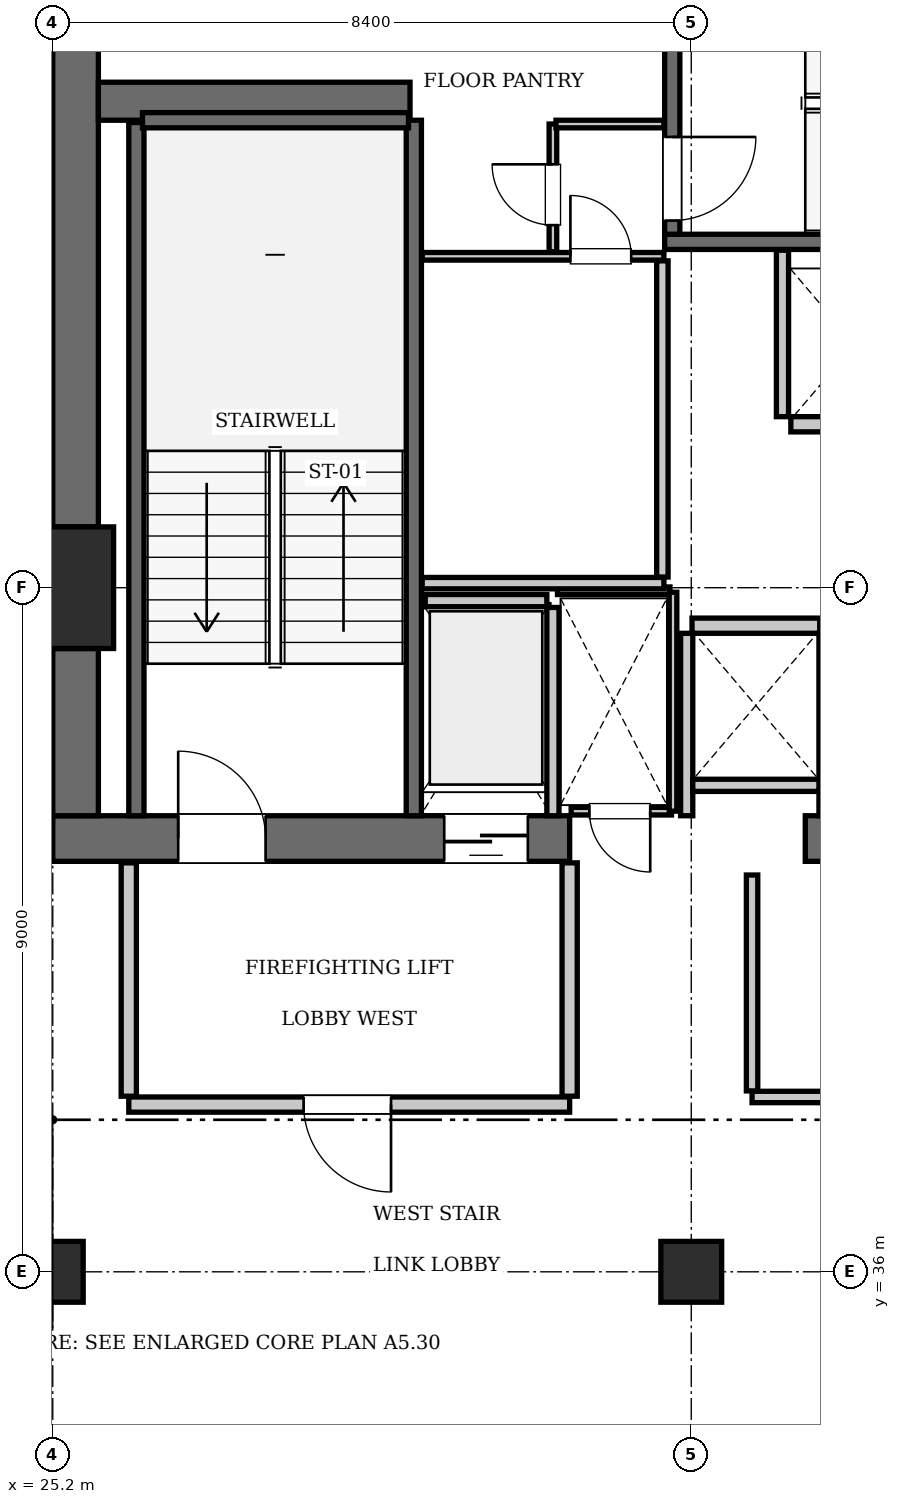
"""IFC4 building model, lengths in metres.
Left out: names, types, materials, properties, quantities, classifications, styles, units other than length and angle.
Written with IfcOpenShell. Run it as: python <this file> out.ifc"""

import sys

from ifc_helpers import new_model, si_unit, direction, frame, frame_2d, origin, origin_2d, place, context, subcontext, project, spatial, rectangle, extrude, element, fill, save


model = new_model("IFC4")
c1 = context("Model", 3, precision=1e-05, world=origin(), true_north=direction((0.0, 1.0)))
c2 = subcontext(c1, "Body", "Model", "MODEL_VIEW")
j1 = project(units=[si_unit("LENGTHUNIT", "METRE"), si_unit("PLANEANGLEUNIT", "RADIAN")], contexts=[c1])
p1 = place(None, origin())
s1 = spatial("IfcSite", under=j1, at=p1, CompositionType="ELEMENT")
p2 = place(p1, origin())
s2 = spatial("IfcBuilding", under=s1, at=p2, CompositionType="ELEMENT")
p3 = place(p2, frame((0.0, 0.0, 270.2)))
s3 = spatial("IfcBuildingStorey", under=s2, at=p3, CompositionType="ELEMENT", Elevation=270.2)
p4 = place(p3, frame((25.2, 45.0, 0.0), z_axis=(0.0, 0.0, 1.0), x_axis=(1.0, 0.0, 0.0)))
e1 = element("IfcColumn", 1, at=p4, inside=s3, PredefinedType="COLUMN", context=c2, shape_type="SweptSolid", body=[
    extrude(rectangle(XDim=1.6, YDim=1.6, at=origin_2d()), origin(), (0.0, 0.0, 1.0), 3.85),
])
p5 = place(p3, frame((25.2, 41.7, 0.0), z_axis=(0.0, 0.0, 1.0), x_axis=(1.0, 0.0, 0.0)))
e2 = element("IfcWall", 2, at=p5, inside=s3, PredefinedType="SHEAR", context=c2, shape_type="SweptSolid", body=[
    extrude(rectangle(XDim=6.8, YDim=0.6, at=frame_2d((3.4, 0.0))), origin(), (0.0, 0.0, 1.0), 3.85),
])
p6 = place(p5, frame((1.65, 0.0, 0.0)))
e3 = element("IfcOpeningElement", 3, at=p6, cuts=e2, PredefinedType="OPENING", context=c2, shape_type="SweptSolid", body=[
    extrude(rectangle(XDim=1.15, YDim=2.15, at=frame_2d((0.575, 1.075))), frame((0.0, 0.31, 0.0), z_axis=(0.0, -1.0, 0.0), x_axis=(1.0, 0.0, 0.0)), (0.0, 0.0, 1.0), 0.62),
])
p7 = place(p5, frame((5.15, 0.0, 0.0)))
e4 = element("IfcOpeningElement", 4, at=p7, cuts=e2, PredefinedType="OPENING", context=c2, shape_type="SweptSolid", body=[
    extrude(rectangle(XDim=1.1, YDim=2.2, at=frame_2d((0.55, 1.1))), frame((0.0, 0.31, 0.0), z_axis=(0.0, -1.0, 0.0), x_axis=(1.0, 0.0, 0.0)), (0.0, 0.0, 1.0), 0.62),
])
p8 = place(p3, frame((35.1, 41.7, 0.0), z_axis=(0.0, 0.0, 1.0), x_axis=(1.0, 0.0, 0.0)))
e5 = element("IfcWall", 5, at=p8, inside=s3, PredefinedType="SHEAR", context=c2, shape_type="SweptSolid", body=[
    extrude(rectangle(XDim=5.4, YDim=0.6, at=frame_2d((2.7, 0.0))), origin(), (0.0, 0.0, 1.0), 3.85),
])
p9 = place(p3, frame((25.5, 42.0, 0.0), z_axis=(0.0, 0.0, 1.0), x_axis=(0.0, 1.0, 0.0)))
e6 = element("IfcWall", 6, at=p9, inside=s3, PredefinedType="SHEAR", context=c2, shape_type="SweptSolid", body=[
    extrude(rectangle(XDim=2.2, YDim=0.6, at=frame_2d((1.1, 0.0))), origin(), (0.0, 0.0, 1.0), 3.85),
])
p10 = place(p3, frame((25.5, 45.8, 0.0), z_axis=(0.0, 0.0, 1.0), x_axis=(0.0, 1.0, 0.0)))
e7 = element("IfcWall", 7, at=p10, inside=s3, PredefinedType="SHEAR", context=c2, shape_type="SweptSolid", body=[
    extrude(rectangle(XDim=7.6, YDim=0.6, at=frame_2d((3.8, 0.0))), origin(), (0.0, 0.0, 1.0), 3.85),
])
p11 = place(p3, frame((25.8, 51.4, 0.0), z_axis=(0.0, 0.0, 1.0), x_axis=(1.0, 0.0, 0.0)))
e8 = element("IfcWall", 8, at=p11, inside=s3, PredefinedType="SHEAR", context=c2, shape_type="SweptSolid", body=[
    extrude(rectangle(XDim=4.1, YDim=0.5, at=frame_2d((2.05, 0.0))), origin(), (0.0, 0.0, 1.0), 3.85),
])
for number, where, z_axis, x_axis in (
    (9, (25.2, 36.0, 0.0), (0.0, 0.0, 1.0), (1.0, 0.0, 0.0)),
    (10, (33.6, 36.0, 0.0), (0.0, 0.0, 1.0), (1.0, 0.0, 0.0)),
):
    element("IfcColumn", number, at=place(p3, frame(where, z_axis=z_axis, x_axis=x_axis)), inside=s3, PredefinedType="COLUMN", context=c2, shape_type="SweptSolid", body=[
        extrude(rectangle(XDim=0.8, YDim=0.8, at=origin_2d()), origin(), (0.0, 0.0, 1.0), 3.85),
    ])
p12 = place(p3, frame((29.95, 42.0, 0.0), z_axis=(0.0, 0.0, 1.0), x_axis=(0.0, 1.0, 0.0)))
e11 = element("IfcWall", 11, at=p12, inside=s3, PredefinedType="SOLIDWALL", context=c2, shape_type="SweptSolid", body=[
    extrude(rectangle(XDim=9.15, YDim=0.2, at=frame_2d((4.575, 0.0))), origin(), (0.0, 0.0, 1.0), 3.61),
])
p13 = place(p3, frame((26.3, 42.0, 0.0), z_axis=(0.0, 0.0, 1.0), x_axis=(0.0, 1.0, 0.0)))
e12 = element("IfcWall", 12, at=p13, inside=s3, PredefinedType="SOLIDWALL", context=c2, shape_type="SweptSolid", body=[
    extrude(rectangle(XDim=9.12, YDim=0.2, at=frame_2d((4.56, 0.0))), origin(), (0.0, 0.0, 1.0), 3.61),
])
p14 = place(p3, frame((26.38, 51.15, 0.0), z_axis=(0.0, 0.0, 1.0), x_axis=(1.0, 0.0, 0.0)))
e13 = element("IfcWall", 13, at=p14, inside=s3, PredefinedType="SOLIDWALL", context=c2, shape_type="SweptSolid", body=[
    extrude(rectangle(XDim=3.5, YDim=0.2, at=frame_2d((1.75, 0.0))), origin(), (0.0, 0.0, 1.0), 3.61),
])
p15 = place(p3, frame((33.25, 49.55, 0.0), z_axis=(0.0, 0.0, 1.0), x_axis=(1.0, 0.0, 0.0)))
e14 = element("IfcWall", 14, at=p15, inside=s3, PredefinedType="SOLIDWALL", context=c2, shape_type="SweptSolid", body=[
    extrude(rectangle(XDim=9.1, YDim=0.2, at=frame_2d((4.55, 0.0))), origin(), (0.0, 0.0, 1.0), 3.61),
])
p16 = place(p3, frame((33.35, 49.65, 0.0), z_axis=(0.0, 0.0, 1.0), x_axis=(0.0, 1.0, 0.0)))
e15 = element("IfcWall", 15, at=p16, inside=s3, PredefinedType="SOLIDWALL", context=c2, shape_type="SweptSolid", body=[
    extrude(rectangle(XDim=3.75, YDim=0.2, at=frame_2d((1.875, 0.0))), origin(), (0.0, 0.0, 1.0), 3.61),
])
p17 = place(p16, frame((0.18, 0.0, 0.0)))
e16 = element("IfcOpeningElement", 16, at=p17, cuts=e15, PredefinedType="OPENING", context=c2, shape_type="SweptSolid", body=[
    extrude(rectangle(XDim=1.1, YDim=2.15, at=frame_2d((0.55, 1.075))), frame((0.0, 0.11, 0.0), z_axis=(0.0, -1.0, 0.0), x_axis=(1.0, 0.0, 0.0)), (0.0, 0.0, 1.0), 0.22),
])
p18 = place(p3, frame((34.91, 47.15, 0.0), z_axis=(0.0, 0.0, 1.0), x_axis=(1.0, 0.0, 0.0)))
e17 = element("IfcWall", 17, at=p18, inside=s3, PredefinedType="SOLIDWALL", context=c2, shape_type="SweptSolid", body=[
    extrude(rectangle(XDim=1.68, YDim=0.2, at=frame_2d((0.84, 0.0))), origin(), (0.0, 0.0, 1.0), 3.61),
])
p19 = place(p3, frame((33.61, 44.5, 0.0), z_axis=(0.0, 0.0, 1.0), x_axis=(1.0, 0.0, 0.0)))
e18 = element("IfcWall", 18, at=p19, inside=s3, PredefinedType="SOLIDWALL", context=c2, shape_type="SweptSolid", body=[
    extrude(rectangle(XDim=1.68, YDim=0.2, at=frame_2d((0.84, 0.0))), origin(), (0.0, 0.0, 1.0), 3.61),
])
p20 = place(p3, frame((30.1, 44.83, 0.0), z_axis=(0.0, 0.0, 1.0), x_axis=(1.0, 0.0, 0.0)))
e19 = element("IfcWall", 19, at=p20, inside=s3, PredefinedType="SOLIDWALL", context=c2, shape_type="SweptSolid", body=[
    extrude(rectangle(XDim=1.6, YDim=0.16, at=frame_2d((0.8, 0.0))), origin(), (0.0, 0.0, 1.0), 3.61),
])
p21 = place(p3, frame((31.78, 42.0, 0.0), z_axis=(0.0, 0.0, 1.0), x_axis=(0.0, 1.0, 0.0)))
e20 = element("IfcWall", 20, at=p21, inside=s3, PredefinedType="SOLIDWALL", context=c2, shape_type="SweptSolid", body=[
    extrude(rectangle(XDim=2.74, YDim=0.16, at=frame_2d((1.37, 0.0))), origin(), (0.0, 0.0, 1.0), 3.61),
])
p22 = place(p3, frame((34.8, 47.25, 0.0), z_axis=(0.0, 0.0, 1.0), x_axis=(0.0, 1.0, 0.0)))
e21 = element("IfcWall", 21, at=p22, inside=s3, PredefinedType="SOLIDWALL", context=c2, shape_type="SweptSolid", body=[
    extrude(rectangle(XDim=2.19, YDim=0.16, at=frame_2d((1.095, 0.0))), origin(), (0.0, 0.0, 1.0), 3.61),
])
for number, where, z_axis, x_axis in (
    (22, (33.54, 42.0, 0.0), (0.0, 0.0, 1.0), (0.0, 1.0, 0.0)),
    (23, (35.36, 42.0, 0.0), (0.0, 0.0, 1.0), (0.0, 1.0, 0.0)),
):
    element("IfcWall", number, at=place(p3, frame(where, z_axis=z_axis, x_axis=x_axis)), inside=s3, PredefinedType="SOLIDWALL", context=c2, shape_type="SweptSolid", body=[
        extrude(rectangle(XDim=2.4, YDim=0.16, at=frame_2d((1.2, 0.0))), origin(), (0.0, 0.0, 1.0), 3.61),
    ])
p23 = place(p3, frame((33.62, 42.4, 0.0), z_axis=(0.0, 0.0, 1.0), x_axis=(1.0, 0.0, 0.0)))
e24 = element("IfcWall", 24, at=p23, inside=s3, PredefinedType="SOLIDWALL", context=c2, shape_type="SweptSolid", body=[
    extrude(rectangle(XDim=1.66, YDim=0.16, at=frame_2d((0.83, 0.0))), origin(), (0.0, 0.0, 1.0), 3.61),
])
p24 = place(p3, frame((26.2, 38.2, 0.0), z_axis=(0.0, 0.0, 1.0), x_axis=(1.0, 0.0, 0.0)))
e25 = element("IfcWall", 25, at=p24, inside=s3, PredefinedType="PARTITIONING", context=c2, shape_type="SweptSolid", body=[
    extrude(rectangle(XDim=5.8, YDim=0.2, at=frame_2d((2.9, 0.0))), origin(), (0.0, 0.0, 1.0), 3.61),
])
p25 = place(p24, frame((2.3, 0.0, 0.0)))
e26 = element("IfcOpeningElement", 26, at=p25, cuts=e25, PredefinedType="OPENING", context=c2, shape_type="SweptSolid", body=[
    extrude(rectangle(XDim=1.15, YDim=2.15, at=frame_2d((0.575, 1.075))), frame((0.0, 0.11, 0.0), z_axis=(0.0, -1.0, 0.0), x_axis=(1.0, 0.0, 0.0)), (0.0, 0.0, 1.0), 0.22),
])
for number, where, z_axis, x_axis in (
    (27, (26.2, 38.31, 0.0), (0.0, 0.0, 1.0), (0.0, 1.0, 0.0)),
    (28, (32.0, 38.31, 0.0), (0.0, 0.0, 1.0), (0.0, 1.0, 0.0)),
):
    element("IfcWall", number, at=place(p3, frame(where, z_axis=z_axis, x_axis=x_axis)), inside=s3, PredefinedType="PARTITIONING", context=c2, shape_type="SweptSolid", body=[
        extrude(rectangle(XDim=3.07, YDim=0.2, at=frame_2d((1.535, 0.0))), origin(), (0.0, 0.0, 1.0), 3.61),
    ])
p26 = place(p3, frame((32.02, 42.06, 0.0), z_axis=(0.0, 0.0, 1.0), x_axis=(1.0, 0.0, 0.0)))
e29 = element("IfcWall", 29, at=p26, inside=s3, PredefinedType="PARTITIONING", context=c2, shape_type="SweptSolid", body=[
    extrude(rectangle(XDim=1.32, YDim=0.1, at=frame_2d((0.66, 0.0))), origin(), (0.0, 0.0, 1.0), 3.61),
])
p27 = place(p26, frame((0.24, 0.0, 0.0)))
e30 = element("IfcOpeningElement", 30, at=p27, cuts=e29, PredefinedType="OPENING", context=c2, shape_type="SweptSolid", body=[
    extrude(rectangle(XDim=0.8, YDim=2.05, at=frame_2d((0.4, 1.025))), frame((0.0, 0.06, 0.0), z_axis=(0.0, -1.0, 0.0), x_axis=(1.0, 0.0, 0.0)), (0.0, 0.0, 1.0), 0.12),
])
p28 = place(p3, frame((31.84, 44.96, 0.0), z_axis=(0.0, 0.0, 1.0), x_axis=(1.0, 0.0, 0.0)))
e31 = element("IfcWall", 31, at=p28, inside=s3, PredefinedType="PARTITIONING", context=c2, shape_type="SweptSolid", body=[
    extrude(rectangle(XDim=1.48, YDim=0.1, at=frame_2d((0.74, 0.0))), origin(), (0.0, 0.0, 1.0), 3.61),
])
p29 = place(p3, frame((33.36, 42.06, 0.0), z_axis=(0.0, 0.0, 1.0), x_axis=(0.0, 1.0, 0.0)))
e32 = element("IfcWall", 32, at=p29, inside=s3, PredefinedType="PARTITIONING", context=c2, shape_type="SweptSolid", body=[
    extrude(rectangle(XDim=2.88, YDim=0.1, at=frame_2d((1.44, 0.0))), origin(), (0.0, 0.0, 1.0), 3.61),
])
p30 = place(p3, frame((30.06, 45.06, 0.0), z_axis=(0.0, 0.0, 1.0), x_axis=(1.0, 0.0, 0.0)))
e33 = element("IfcWall", 33, at=p30, inside=s3, PredefinedType="PARTITIONING", context=c2, shape_type="SweptSolid", body=[
    extrude(rectangle(XDim=3.18, YDim=0.15, at=frame_2d((1.59, 0.0))), origin(), (0.0, 0.0, 1.0), 3.61),
])
p31 = place(p3, frame((33.22, 45.14, 0.0), z_axis=(0.0, 0.0, 1.0), x_axis=(0.0, 1.0, 0.0)))
e34 = element("IfcWall", 34, at=p31, inside=s3, PredefinedType="PARTITIONING", context=c2, shape_type="SweptSolid", body=[
    extrude(rectangle(XDim=4.16, YDim=0.15, at=frame_2d((2.08, 0.0))), origin(), (0.0, 0.0, 1.0), 3.61),
])
p32 = place(p3, frame((30.06, 49.36, 0.0), z_axis=(0.0, 0.0, 1.0), x_axis=(1.0, 0.0, 0.0)))
e35 = element("IfcWall", 35, at=p32, inside=s3, PredefinedType="PARTITIONING", context=c2, shape_type="SweptSolid", body=[
    extrude(rectangle(XDim=3.18, YDim=0.1, at=frame_2d((1.59, 0.0))), origin(), (0.0, 0.0, 1.0), 3.61),
])
p33 = place(p32, frame((1.95, 0.0, 0.0)))
e36 = element("IfcOpeningElement", 36, at=p33, cuts=e35, PredefinedType="OPENING", context=c2, shape_type="SweptSolid", body=[
    extrude(rectangle(XDim=0.8, YDim=2.05, at=frame_2d((0.4, 1.025))), frame((0.0, 0.06, 0.0), z_axis=(0.0, -1.0, 0.0), x_axis=(1.0, 0.0, 0.0)), (0.0, 0.0, 1.0), 0.12),
])
p34 = place(p3, frame((31.78, 49.42, 0.0), z_axis=(0.0, 0.0, 1.0), x_axis=(0.0, 1.0, 0.0)))
e37 = element("IfcWall", 37, at=p34, inside=s3, PredefinedType="PARTITIONING", context=c2, shape_type="SweptSolid", body=[
    extrude(rectangle(XDim=1.68, YDim=0.1, at=frame_2d((0.84, 0.0))), origin(), (0.0, 0.0, 1.0), 3.61),
])
p35 = place(p34, frame((0.35, 0.0, 0.0)))
e38 = element("IfcOpeningElement", 38, at=p35, cuts=e37, PredefinedType="OPENING", context=c2, shape_type="SweptSolid", body=[
    extrude(rectangle(XDim=0.8, YDim=2.05, at=frame_2d((0.4, 1.025))), frame((0.0, 0.06, 0.0), z_axis=(0.0, -1.0, 0.0), x_axis=(1.0, 0.0, 0.0)), (0.0, 0.0, 1.0), 0.12),
])
p36 = place(p3, frame((31.82, 51.1, 0.0), z_axis=(0.0, 0.0, 1.0), x_axis=(1.0, 0.0, 0.0)))
e39 = element("IfcWall", 39, at=p36, inside=s3, PredefinedType="PARTITIONING", context=c2, shape_type="SweptSolid", body=[
    extrude(rectangle(XDim=1.42, YDim=0.1, at=frame_2d((0.71, 0.0))), origin(), (0.0, 0.0, 1.0), 3.61),
])
p37 = place(p3, frame((34.4, 38.3, 0.0), z_axis=(0.0, 0.0, 1.0), x_axis=(1.0, 0.0, 0.0)))
e40 = element("IfcWall", 40, at=p37, inside=s3, PredefinedType="PARTITIONING", context=c2, shape_type="SweptSolid", body=[
    extrude(rectangle(XDim=5.92, YDim=0.15, at=frame_2d((2.96, 0.0))), origin(), (0.0, 0.0, 1.0), 3.61),
])
p38 = place(p37, frame((2.4, 0.0, 0.0)))
e41 = element("IfcOpeningElement", 41, at=p38, cuts=e40, PredefinedType="OPENING", context=c2, shape_type="SweptSolid", body=[
    extrude(rectangle(XDim=0.9, YDim=2.1, at=frame_2d((0.45, 1.05))), frame((0.0, 0.085, 0.0), z_axis=(0.0, -1.0, 0.0), x_axis=(1.0, 0.0, 0.0)), (0.0, 0.0, 1.0), 0.17),
])
p39 = place(p3, frame((34.4, 38.38, 0.0), z_axis=(0.0, 0.0, 1.0), x_axis=(0.0, 1.0, 0.0)))
e42 = element("IfcWall", 42, at=p39, inside=s3, PredefinedType="PARTITIONING", context=c2, shape_type="SweptSolid", body=[
    extrude(rectangle(XDim=2.84, YDim=0.15, at=frame_2d((1.42, 0.0))), origin(), (0.0, 0.0, 1.0), 3.61),
])
p40 = place(p6, origin())
e43 = element("IfcDoor", 43, at=p40, inside=s3, OperationType="SINGLE_SWING_LEFT", PredefinedType="DOOR", context=c2, shape_type="SweptSolid", body=[
    extrude(rectangle(XDim=1.15, YDim=2.15, at=frame_2d((0.575, 1.075))), frame((0.0, 0.025, 0.0), z_axis=(0.0, -1.0, 0.0), x_axis=(1.0, 0.0, 0.0)), (0.0, 0.0, 1.0), 0.05),
])
fill(e3, e43)
p41 = place(p17, frame((1.1, 0.0, 0.0), z_axis=(0.0, 0.0, 1.0), x_axis=(-1.0, 0.0, 0.0)))
e44 = element("IfcDoor", 44, at=p41, inside=s3, OperationType="SINGLE_SWING_LEFT", PredefinedType="DOOR", context=c2, shape_type="SweptSolid", body=[
    extrude(rectangle(XDim=1.1, YDim=2.15, at=frame_2d((0.55, 1.075))), frame((0.0, 0.025, 0.0), z_axis=(0.0, -1.0, 0.0), x_axis=(1.0, 0.0, 0.0)), (0.0, 0.0, 1.0), 0.05),
])
fill(e16, e44)
p42 = place(p7, frame((1.1, 0.0, 0.0), z_axis=(0.0, 0.0, 1.0), x_axis=(-1.0, 0.0, 0.0)))
e45 = element("IfcDoor", 45, at=p42, inside=s3, OperationType="SLIDING_TO_LEFT", PredefinedType="DOOR", context=c2, shape_type="SweptSolid", body=[
    extrude(rectangle(XDim=1.1, YDim=2.2, at=frame_2d((0.55, 1.1))), frame((0.0, 0.025, 0.0), z_axis=(0.0, -1.0, 0.0), x_axis=(1.0, 0.0, 0.0)), (0.0, 0.0, 1.0), 0.05),
])
fill(e4, e45)
p43 = place(p25, frame((1.15, 0.0, 0.0), z_axis=(0.0, 0.0, 1.0), x_axis=(-1.0, 0.0, 0.0)))
e46 = element("IfcDoor", 46, at=p43, inside=s3, OperationType="SINGLE_SWING_LEFT", PredefinedType="DOOR", context=c2, shape_type="SweptSolid", body=[
    extrude(rectangle(XDim=1.15, YDim=2.15, at=frame_2d((0.575, 1.075))), frame((0.0, 0.025, 0.0), z_axis=(0.0, -1.0, 0.0), x_axis=(1.0, 0.0, 0.0)), (0.0, 0.0, 1.0), 0.05),
])
fill(e26, e46)
p44 = place(p27, frame((0.8, 0.0, 0.0), z_axis=(0.0, 0.0, 1.0), x_axis=(-1.0, 0.0, 0.0)))
e47 = element("IfcDoor", 47, at=p44, inside=s3, OperationType="SINGLE_SWING_LEFT", PredefinedType="DOOR", context=c2, shape_type="SweptSolid", body=[
    extrude(rectangle(XDim=0.8, YDim=2.05, at=frame_2d((0.4, 1.025))), frame((0.0, 0.025, 0.0), z_axis=(0.0, -1.0, 0.0), x_axis=(1.0, 0.0, 0.0)), (0.0, 0.0, 1.0), 0.05),
])
fill(e30, e47)
p45 = place(p33, origin())
e48 = element("IfcDoor", 48, at=p45, inside=s3, OperationType="SINGLE_SWING_LEFT", PredefinedType="DOOR", context=c2, shape_type="SweptSolid", body=[
    extrude(rectangle(XDim=0.8, YDim=2.05, at=frame_2d((0.4, 1.025))), frame((0.0, 0.025, 0.0), z_axis=(0.0, -1.0, 0.0), x_axis=(1.0, 0.0, 0.0)), (0.0, 0.0, 1.0), 0.05),
])
fill(e36, e48)
p46 = place(p35, origin())
e49 = element("IfcDoor", 49, at=p46, inside=s3, OperationType="SINGLE_SWING_RIGHT", PredefinedType="DOOR", context=c2, shape_type="SweptSolid", body=[
    extrude(rectangle(XDim=0.8, YDim=2.05, at=frame_2d((0.4, 1.025))), frame((0.0, 0.025, 0.0), z_axis=(0.0, -1.0, 0.0), x_axis=(1.0, 0.0, 0.0)), (0.0, 0.0, 1.0), 0.05),
])
fill(e38, e49)
save(model, sys.argv[1])
